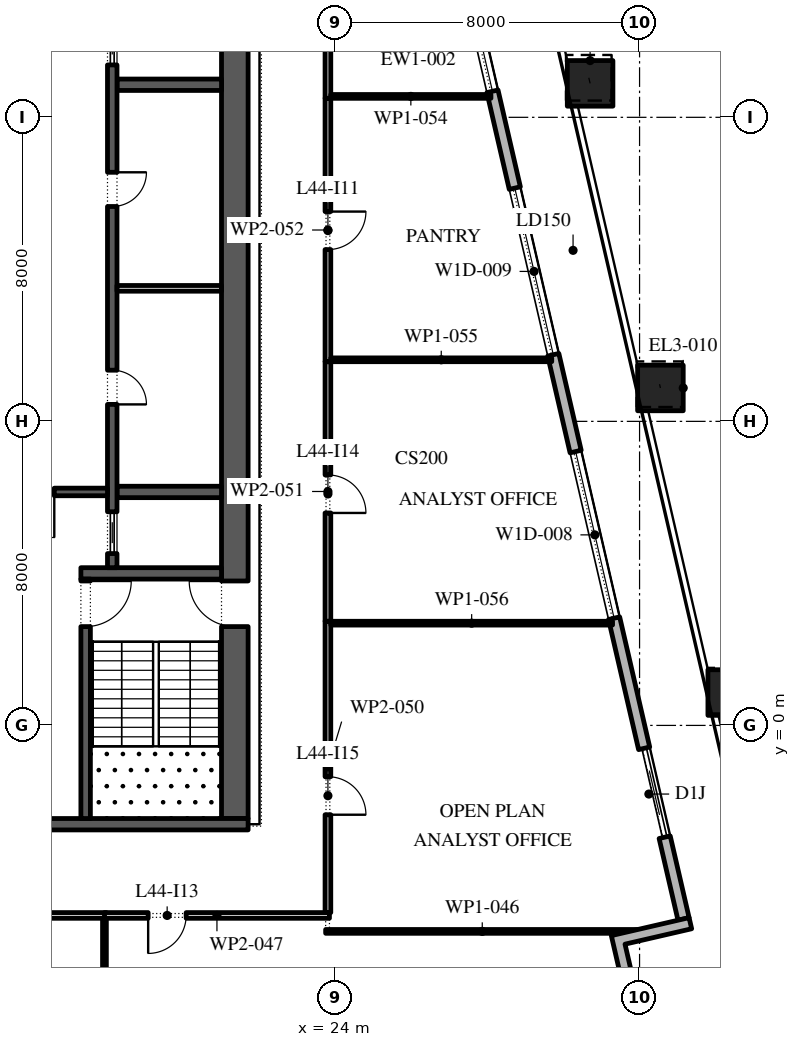
"""IFC4 building model, lengths in metres.
Left out: names, types, materials, properties, quantities, classifications, styles, units other than length and angle.
Written with IfcOpenShell. Run it as: python <this file> out.ifc"""

import sys

from ifc_helpers import new_model, si_unit, direction, frame, frame_2d, origin, origin_2d, place, context, subcontext, project, spatial, polyline, rectangle, outline, extrude, element, fill, save


model = new_model("IFC4")
c1 = context("Model", 3, precision=1e-05, world=origin(), true_north=direction((0.0, 1.0)))
c2 = subcontext(c1, "Body", "Model", "MODEL_VIEW")
j1 = project(units=[si_unit("LENGTHUNIT", "METRE"), si_unit("PLANEANGLEUNIT", "RADIAN")], contexts=[c1])
p1 = place(None, origin())
s1 = spatial("IfcSite", under=j1, at=p1, CompositionType="ELEMENT")
p2 = place(p1, origin())
s2 = spatial("IfcBuilding", under=s1, at=p2, CompositionType="ELEMENT")
p3 = place(p2, frame((0.0, 0.0, 201.0)))
s3 = spatial("IfcBuildingStorey", under=s2, at=p3, CompositionType="ELEMENT", Elevation=201.0)
p4 = place(p3, frame((34.399, 0.865, 0.0), z_axis=(-0.00267375834, 0.011741286623, 0.999927493974), x_axis=(-0.975037935076, -0.222038341651, 0.0)))
e1 = element("IfcColumn", 1, at=p4, inside=s3, PredefinedType="COLUMN", context=c2, shape_type="SweptSolid", body=[
    extrude(rectangle(XDim=1.2, YDim=1.2, at=origin_2d()), origin(), (0.0, 0.0, 1.0), 4.2),
])
p5 = place(p3, frame((32.549, 8.879, 0.0), z_axis=(-0.005404472139, 0.023419379268, 0.999711120452), x_axis=(-0.974391195695, -0.224859506699, 0.0)))
e2 = element("IfcColumn", 2, at=p5, inside=s3, PredefinedType="COLUMN", context=c2, shape_type="SweptSolid", body=[
    extrude(rectangle(XDim=1.2, YDim=1.2, at=origin_2d()), origin(), (0.0, 0.0, 1.0), 4.201),
])
p6 = place(p3, frame((30.698, 16.893, 0.0), z_axis=(-0.008074763646, 0.035029370347, 0.999353661826), x_axis=(-0.974445638882, -0.224623455729, 0.0)))
e3 = element("IfcColumn", 3, at=p6, inside=s3, PredefinedType="COLUMN", context=c2, shape_type="SweptSolid", body=[
    extrude(rectangle(XDim=1.2, YDim=1.2, at=origin_2d()), origin(), (0.0, 0.0, 1.0), 4.203),
])
p7 = place(p3, frame((33.157, -5.092, 0.0), z_axis=(0.0, 0.0, 1.0), x_axis=(-0.224950279389, 0.974370243697, 0.0)))
e4 = element("IfcWall", 4, at=p7, inside=s3, PredefinedType="STANDARD", context=c2, shape_type="SweptSolid", body=[
    extrude(rectangle(XDim=49.5, YDim=0.3, at=frame_2d((24.75, 0.0))), origin(), (0.0, 0.0, 1.0), 4.0),
])
p8 = place(p7, frame((2.207, 0.0, 0.0)))
e5 = element("IfcOpeningElement", 5, at=p8, cuts=e4, PredefinedType="OPENING", context=c2, shape_type="SweptSolid", body=[
    extrude(rectangle(XDim=2.4, YDim=3.125, at=frame_2d((1.2, 1.562))), frame((0.0, 0.16, 0.0), z_axis=(0.0, -1.0, 0.0), x_axis=(1.0, 0.0, 0.0)), (0.0, 0.0, 1.0), 0.32),
])
p9 = place(p7, frame((8.121, 0.0, 0.45)))
e6 = element("IfcOpeningElement", 6, at=p9, cuts=e4, PredefinedType="OPENING", context=c2, shape_type="SweptSolid", body=[
    extrude(rectangle(XDim=4.5, YDim=2.875, at=frame_2d((2.25, 1.438))), frame((0.0, 0.16, 0.0), z_axis=(0.0, -1.0, 0.0), x_axis=(1.0, 0.0, 0.0)), (0.0, 0.0, 1.0), 0.32),
])
p10 = place(p7, frame((15.236, 0.0, 0.45)))
e7 = element("IfcOpeningElement", 7, at=p10, cuts=e4, PredefinedType="OPENING", context=c2, shape_type="SweptSolid", body=[
    extrude(rectangle(XDim=4.5, YDim=2.875, at=frame_2d((2.25, 1.438))), frame((0.0, 0.16, 0.0), z_axis=(0.0, -1.0, 0.0), x_axis=(1.0, 0.0, 0.0)), (0.0, 0.0, 1.0), 0.32),
])
p11 = place(p7, frame((22.35, 0.0, 0.45)))
e8 = element("IfcOpeningElement", 8, at=p11, cuts=e4, PredefinedType="OPENING", context=c2, shape_type="SweptSolid", body=[
    extrude(rectangle(XDim=4.5, YDim=3.0, at=frame_2d((2.25, 1.5))), frame((0.0, 0.16, 0.0), z_axis=(0.0, -1.0, 0.0), x_axis=(1.0, 0.0, 0.0)), (0.0, 0.0, 1.0), 0.32),
])
p12 = place(p7, frame((30.514, 0.0, 0.0)))
e9 = element("IfcOpeningElement", 9, at=p12, cuts=e4, PredefinedType="OPENING", context=c2, shape_type="SweptSolid", body=[
    extrude(rectangle(XDim=2.4, YDim=3.45, at=frame_2d((1.2, 1.725))), frame((0.0, 0.16, 0.0), z_axis=(0.0, -1.0, 0.0), x_axis=(1.0, 0.0, 0.0)), (0.0, 0.0, 1.0), 0.32),
])
p13 = place(p7, frame((36.579, 0.0, 0.45)))
e10 = element("IfcOpeningElement", 10, at=p13, cuts=e4, PredefinedType="OPENING", context=c2, shape_type="SweptSolid", body=[
    extrude(rectangle(XDim=4.5, YDim=3.05, at=frame_2d((2.25, 1.525))), frame((0.0, 0.16, 0.0), z_axis=(0.0, -1.0, 0.0), x_axis=(1.0, 0.0, 0.0)), (0.0, 0.0, 1.0), 0.32),
])
p14 = place(p7, frame((43.693, 0.0, 0.45)))
e11 = element("IfcOpeningElement", 11, at=p14, cuts=e4, PredefinedType="OPENING", context=c2, shape_type="SweptSolid", body=[
    extrude(rectangle(XDim=4.5, YDim=3.05, at=frame_2d((2.25, 1.525))), frame((0.0, 0.16, 0.0), z_axis=(0.0, -1.0, 0.0), x_axis=(1.0, 0.0, 0.0)), (0.0, 0.0, 1.0), 0.32),
])
p15 = place(p3, origin())
e12 = element("IfcWall", 12, at=p15, inside=s3, PredefinedType="STANDARD", context=c2, shape_type="SweptSolid", body=[
    extrude(outline(polyline([(31.662, -7.285), (31.257, -5.531), (33.303, -5.058), (33.371, -5.351), (31.617, -5.756), (32.022, -7.51), (30.268, -7.914), (30.605, -9.376), (30.313, -9.443), (29.908, -7.69), (31.662, -7.285)])), origin(), (0.0, 0.0, 1.0), 4.0),
])
p16 = place(p3, frame((21.35, -2.45, 0.0), z_axis=(0.0, 0.0, 1.0), x_axis=(0.0, 1.0, 0.0)))
e13 = element("IfcWall", 13, at=p16, inside=s3, PredefinedType="SHEAR", context=c2, shape_type="SweptSolid", body=[
    extrude(rectangle(XDim=27.9, YDim=0.7, at=frame_2d((13.95, 0.0))), origin(), (0.0, 0.0, 1.0), 4.0),
])
p17 = place(p16, frame((5.05, 0.0, 0.0)))
e14 = element("IfcOpeningElement", 14, at=p17, cuts=e13, PredefinedType="OPENING", context=c2, shape_type="SweptSolid", body=[
    extrude(rectangle(XDim=1.2, YDim=2.1, at=frame_2d((0.6, 1.05))), frame((0.0, 0.36, 0.0), z_axis=(0.0, -1.0, 0.0), x_axis=(1.0, 0.0, 0.0)), (0.0, 0.0, 1.0), 0.72),
])
p18 = place(p16, frame((21.65, 0.0, 0.0)))
e15 = element("IfcOpeningElement", 15, at=p18, cuts=e13, PredefinedType="OPENING", context=c2, shape_type="SweptSolid", body=[
    extrude(rectangle(XDim=1.2, YDim=2.1, at=frame_2d((0.6, 1.05))), frame((0.0, 0.36, 0.0), z_axis=(0.0, -1.0, 0.0), x_axis=(1.0, 0.0, 0.0)), (0.0, 0.0, 1.0), 0.72),
])
p19 = place(p3, frame((10.3, -2.6, 0.0), z_axis=(0.0, 0.0, 1.0), x_axis=(1.0, 0.0, 0.0)))
e16 = element("IfcWall", 16, at=p19, inside=s3, PredefinedType="SHEAR", context=c2, shape_type="SweptSolid", body=[
    extrude(rectangle(XDim=11.4, YDim=0.3, at=frame_2d((5.7, 0.0))), origin(), (0.0, 0.0, 1.0), 4.0),
])
p20 = place(p3, frame((17.3, 4.0, 0.0), z_axis=(0.0, 0.0, 1.0), x_axis=(1.0, 0.0, 0.0)))
e17 = element("IfcWall", 17, at=p20, inside=s3, PredefinedType="SHEAR", context=c2, shape_type="SweptSolid", body=[
    extrude(rectangle(XDim=3.7, YDim=0.3, at=frame_2d((1.85, 0.0))), origin(), (0.0, 0.0, 1.0), 4.0),
])
p21 = place(p3, frame((17.425, -2.45, 0.0), z_axis=(0.0, 0.0, 1.0), x_axis=(0.0, 1.0, 0.0)))
e18 = element("IfcWall", 18, at=p21, inside=s3, PredefinedType="SHEAR", context=c2, shape_type="SweptSolid", body=[
    extrude(rectangle(XDim=6.3, YDim=0.25, at=frame_2d((3.15, 0.0))), origin(), (0.0, 0.0, 1.0), 4.0),
])
p22 = place(p21, frame((5.05, 0.0, 0.0)))
e19 = element("IfcOpeningElement", 19, at=p22, cuts=e18, PredefinedType="OPENING", context=c2, shape_type="SweptSolid", body=[
    extrude(rectangle(XDim=1.2, YDim=2.1, at=frame_2d((0.6, 1.05))), frame((0.0, 0.135, 0.0), z_axis=(0.0, -1.0, 0.0), x_axis=(1.0, 0.0, 0.0)), (0.0, 0.0, 1.0), 0.27),
])
for number, where, z_axis, x_axis in (
    (20, (18.25, 6.143, 0.0), (0.0, 0.0, 1.0), (1.0, 0.0, 0.0)),
    (21, (18.25, 16.857, 0.0), (0.0, 0.0, 1.0), (1.0, 0.0, 0.0)),
):
    element("IfcWall", number, at=place(p3, frame(where, z_axis=z_axis, x_axis=x_axis)), inside=s3, PredefinedType="SHEAR", context=c2, shape_type="SweptSolid", body=[
        extrude(rectangle(XDim=2.75, YDim=0.3, at=frame_2d((1.375, 0.0))), origin(), (0.0, 0.0, 1.0), 4.0),
    ])
p23 = place(p3, frame((18.125, 4.15, 0.0), z_axis=(0.0, 0.0, 1.0), x_axis=(0.0, 1.0, 0.0)))
e22 = element("IfcWall", 22, at=p23, inside=s3, PredefinedType="SHEAR", context=c2, shape_type="SweptSolid", body=[
    extrude(rectangle(XDim=14.7, YDim=0.25, at=frame_2d((7.35, 0.0))), origin(), (0.0, 0.0, 1.0), 4.0),
])
p24 = place(p23, frame((4.296, 0.0, 0.0)))
e23 = element("IfcOpeningElement", 23, at=p24, cuts=e22, PredefinedType="OPENING", context=c2, shape_type="SweptSolid", body=[
    extrude(rectangle(XDim=0.9, YDim=2.1, at=frame_2d((0.45, 1.05))), frame((0.0, 0.135, 0.0), z_axis=(0.0, -1.0, 0.0), x_axis=(1.0, 0.0, 0.0)), (0.0, 0.0, 1.0), 0.27),
])
p25 = place(p23, frame((9.504, 0.0, 0.0)))
e24 = element("IfcOpeningElement", 24, at=p25, cuts=e22, PredefinedType="OPENING", context=c2, shape_type="SweptSolid", body=[
    extrude(rectangle(XDim=0.9, YDim=2.1, at=frame_2d((0.45, 1.05))), frame((0.0, 0.135, 0.0), z_axis=(0.0, -1.0, 0.0), x_axis=(1.0, 0.0, 0.0)), (0.0, 0.0, 1.0), 0.27),
])
p26 = place(p23, frame((0.371, 0.0, 0.0)))
e25 = element("IfcOpeningElement", 25, at=p26, cuts=e22, PredefinedType="OPENING", context=c2, shape_type="SweptSolid", body=[
    extrude(rectangle(XDim=1.1, YDim=2.1, at=frame_2d((0.55, 1.05))), frame((0.0, 0.135, 0.0), z_axis=(0.0, -1.0, 0.0), x_axis=(1.0, 0.0, 0.0)), (0.0, 0.0, 1.0), 0.27),
])
p27 = place(p23, frame((13.229, 0.0, 0.0)))
e26 = element("IfcOpeningElement", 26, at=p27, cuts=e22, PredefinedType="OPENING", context=c2, shape_type="SweptSolid", body=[
    extrude(rectangle(XDim=1.1, YDim=2.1, at=frame_2d((0.55, 1.05))), frame((0.0, 0.135, 0.0), z_axis=(0.0, -1.0, 0.0), x_axis=(1.0, 0.0, 0.0)), (0.0, 0.0, 1.0), 0.27),
])
p28 = place(p3, frame((18.25, 11.5, 0.0), z_axis=(0.0, 0.0, 1.0), x_axis=(1.0, 0.0, 0.0)))
e27 = element("IfcWall", 27, at=p28, inside=s3, PredefinedType="PARTITIONING", context=c2, shape_type="SweptSolid", body=[
    extrude(rectangle(XDim=2.75, YDim=0.15, at=frame_2d((1.375, 0.0))), origin(), (0.0, 0.0, 1.0), 4.0),
])
p29 = place(p3, frame((14.0, 6.143, 0.0), z_axis=(0.0, 0.0, 1.0), x_axis=(1.0, 0.0, 0.0)))
e28 = element("IfcWall", 28, at=p29, inside=s3, PredefinedType="SHEAR", context=c2, shape_type="SweptSolid", body=[
    extrude(rectangle(XDim=4.0, YDim=0.2, at=frame_2d((2.0, 0.0))), origin(), (0.0, 0.0, 1.0), 4.0),
])
p30 = place(p29, frame((1.4, 0.0, 0.0)))
e29 = element("IfcOpeningElement", 29, at=p30, cuts=e28, PredefinedType="OPENING", context=c2, shape_type="SweptSolid", body=[
    extrude(rectangle(XDim=1.2, YDim=2.1, at=frame_2d((0.6, 1.05))), frame((0.0, 0.11, 0.0), z_axis=(0.0, -1.0, 0.0), x_axis=(1.0, 0.0, 0.0)), (0.0, 0.0, 1.0), 0.22),
])
p31 = place(p3, frame((17.97, -5.0, 0.0), z_axis=(0.0, 0.0, 1.0), x_axis=(-1.0, 0.0, 0.0)))
e30 = element("IfcWall", 30, at=p31, inside=s3, PredefinedType="PARTITIONING", context=c2, shape_type="SweptSolid", body=[
    extrude(rectangle(XDim=7.97, YDim=0.15, at=frame_2d((3.985, 0.0))), origin(), (0.0, 0.0, 1.0), 4.0),
])
p32 = place(p3, frame((17.92, -5.075, 0.0), z_axis=(0.0, 0.0, 1.0), x_axis=(0.0, -1.0, 0.0)))
e31 = element("IfcWall", 31, at=p32, inside=s3, PredefinedType="PARTITIONING", context=c2, shape_type="SweptSolid", body=[
    extrude(rectangle(XDim=7.312, YDim=0.1, at=frame_2d((3.656, 0.0))), origin(), (0.0, 0.0, 1.0), 4.0),
])
p33 = place(p3, frame((23.74, -5.42, 0.0), z_axis=(0.0, 0.0, 1.0), x_axis=(1.0, 0.0, 0.0)))
e32 = element("IfcWall", 32, at=p33, inside=s3, PredefinedType="PARTITIONING", context=c2, shape_type="SweptSolid", body=[
    extrude(rectangle(XDim=8.242, YDim=0.1, at=frame_2d((4.121, 0.0))), origin(), (0.0, 0.0, 1.0), 4.0),
])
p34 = place(p3, frame((23.84, -5.0, 0.0), z_axis=(0.0, 0.0, 1.0), x_axis=(-1.0, 0.0, 0.0)))
e33 = element("IfcWall", 33, at=p34, inside=s3, PredefinedType="PARTITIONING", context=c2, shape_type="SweptSolid", body=[
    extrude(rectangle(XDim=5.92, YDim=0.15, at=frame_2d((2.96, 0.0))), origin(), (0.0, 0.0, 1.0), 4.0),
])
p35 = place(p34, frame((3.77, 0.0, 0.0)))
e34 = element("IfcOpeningElement", 34, at=p35, cuts=e33, PredefinedType="OPENING", context=c2, shape_type="SweptSolid", body=[
    extrude(rectangle(XDim=1.0, YDim=2.1, at=frame_2d((0.5, 1.05))), frame((0.0, 0.085, 0.0), z_axis=(0.0, -1.0, 0.0), x_axis=(1.0, 0.0, 0.0)), (0.0, 0.0, 1.0), 0.17),
])
p36 = place(p3, frame((23.8, 2.74, 0.0), z_axis=(0.0, 0.0, 1.0), x_axis=(0.0, -1.0, 0.0)))
e35 = element("IfcWall", 35, at=p36, inside=s3, PredefinedType="PARTITIONING", context=c2, shape_type="SweptSolid", body=[
    extrude(rectangle(XDim=7.665, YDim=0.15, at=frame_2d((3.833, 0.0))), origin(), (0.0, 0.0, 1.0), 4.0),
])
p37 = place(p36, frame((4.09, 0.0, 0.0)))
e36 = element("IfcOpeningElement", 36, at=p37, cuts=e35, PredefinedType="OPENING", context=c2, shape_type="SweptSolid", body=[
    extrude(rectangle(XDim=1.0, YDim=2.1, at=frame_2d((0.5, 1.05))), frame((0.0, 0.085, 0.0), z_axis=(0.0, -1.0, 0.0), x_axis=(1.0, 0.0, 0.0)), (0.0, 0.0, 1.0), 0.17),
])
p38 = place(p3, frame((23.8, 9.57, 0.0), z_axis=(0.0, 0.0, 1.0), x_axis=(0.0, -1.0, 0.0)))
e37 = element("IfcWall", 37, at=p38, inside=s3, PredefinedType="PARTITIONING", context=c2, shape_type="SweptSolid", body=[
    extrude(rectangle(XDim=6.83, YDim=0.15, at=frame_2d((3.415, 0.0))), origin(), (0.0, 0.0, 1.0), 4.0),
])
p39 = place(p38, frame((2.98, 0.0, 0.0)))
e38 = element("IfcOpeningElement", 38, at=p39, cuts=e37, PredefinedType="OPENING", context=c2, shape_type="SweptSolid", body=[
    extrude(rectangle(XDim=1.0, YDim=2.1, at=frame_2d((0.5, 1.05))), frame((0.0, 0.085, 0.0), z_axis=(0.0, -1.0, 0.0), x_axis=(1.0, 0.0, 0.0)), (0.0, 0.0, 1.0), 0.17),
])
p40 = place(p3, frame((23.8, 16.5, 0.0), z_axis=(0.0, 0.0, 1.0), x_axis=(0.0, -1.0, 0.0)))
e39 = element("IfcWall", 39, at=p40, inside=s3, PredefinedType="PARTITIONING", context=c2, shape_type="SweptSolid", body=[
    extrude(rectangle(XDim=6.93, YDim=0.15, at=frame_2d((3.465, 0.0))), origin(), (0.0, 0.0, 1.0), 4.0),
])
p41 = place(p40, frame((2.98, 0.0, 0.0)))
e40 = element("IfcOpeningElement", 40, at=p41, cuts=e39, PredefinedType="OPENING", context=c2, shape_type="SweptSolid", body=[
    extrude(rectangle(XDim=1.0, YDim=2.1, at=frame_2d((0.5, 1.05))), frame((0.0, 0.085, 0.0), z_axis=(0.0, -1.0, 0.0), x_axis=(1.0, 0.0, 0.0)), (0.0, 0.0, 1.0), 0.17),
])
p42 = place(p3, frame((23.8, 27.2, 0.0), z_axis=(0.0, 0.0, 1.0), x_axis=(0.0, -1.0, 0.0)))
e41 = element("IfcWall", 41, at=p42, inside=s3, PredefinedType="PARTITIONING", context=c2, shape_type="SweptSolid", body=[
    extrude(rectangle(XDim=10.7, YDim=0.15, at=frame_2d((5.35, 0.0))), origin(), (0.0, 0.0, 1.0), 4.0),
])
p43 = place(p42, frame((6.0, 0.0, 0.0)))
e42 = element("IfcOpeningElement", 42, at=p43, cuts=e41, PredefinedType="OPENING", context=c2, shape_type="SweptSolid", body=[
    extrude(rectangle(XDim=1.0, YDim=2.1, at=frame_2d((0.5, 1.05))), frame((0.0, 0.085, 0.0), z_axis=(0.0, -1.0, 0.0), x_axis=(1.0, 0.0, 0.0)), (0.0, 0.0, 1.0), 0.17),
])
p44 = place(p3, frame((28.089, 16.55, 0.0), z_axis=(0.0, 0.0, 1.0), x_axis=(-1.0, 0.0, 0.0)))
e43 = element("IfcWall", 43, at=p44, inside=s3, PredefinedType="PARTITIONING", context=c2, shape_type="SweptSolid", body=[
    extrude(rectangle(XDim=4.214, YDim=0.1, at=frame_2d((2.107, 0.0))), origin(), (0.0, 0.0, 1.0), 4.0),
])
p45 = place(p3, frame((29.689, 9.62, 0.0), z_axis=(0.0, 0.0, 1.0), x_axis=(-1.0, 0.0, 0.0)))
e44 = element("IfcWall", 44, at=p45, inside=s3, PredefinedType="PARTITIONING", context=c2, shape_type="SweptSolid", body=[
    extrude(rectangle(XDim=5.814, YDim=0.1, at=frame_2d((2.907, 0.0))), origin(), (0.0, 0.0, 1.0), 4.0),
])
p46 = place(p3, frame((31.289, 2.69, 0.0), z_axis=(0.0, 0.0, 1.0), x_axis=(-1.0, 0.0, 0.0)))
e45 = element("IfcWall", 45, at=p46, inside=s3, PredefinedType="PARTITIONING", context=c2, shape_type="SweptSolid", body=[
    extrude(rectangle(XDim=7.414, YDim=0.1, at=frame_2d((3.707, 0.0))), origin(), (0.0, 0.0, 1.0), 4.0),
])
p47 = place(p8, origin())
e46 = element("IfcDoor", 46, at=p47, inside=s3, OperationType="DOUBLE_DOOR_SLIDING", PredefinedType="DOOR", context=c2, shape_type="SweptSolid", body=[
    extrude(rectangle(XDim=2.4, YDim=3.125, at=frame_2d((1.2, 1.562))), frame((0.0, 0.025, 0.0), z_axis=(0.0, -1.0, 0.0), x_axis=(1.0, 0.0, 0.0)), (0.0, 0.0, 1.0), 0.05),
])
fill(e5, e46)
p48 = place(p9, origin())
e47 = element("IfcWindow", 47, at=p48, inside=s3, PartitioningType="DOUBLE_PANEL_VERTICAL", PredefinedType="WINDOW", context=c2, shape_type="SweptSolid", body=[
    extrude(rectangle(XDim=4.5, YDim=2.875, at=frame_2d((2.25, 1.438))), frame((0.0, 0.03, 0.0), z_axis=(0.0, -1.0, 0.0), x_axis=(1.0, 0.0, 0.0)), (0.0, 0.0, 1.0), 0.06),
])
fill(e6, e47)
p49 = place(p10, origin())
e48 = element("IfcWindow", 48, at=p49, inside=s3, PartitioningType="DOUBLE_PANEL_VERTICAL", PredefinedType="WINDOW", context=c2, shape_type="SweptSolid", body=[
    extrude(rectangle(XDim=4.5, YDim=2.875, at=frame_2d((2.25, 1.438))), frame((0.0, 0.03, 0.0), z_axis=(0.0, -1.0, 0.0), x_axis=(1.0, 0.0, 0.0)), (0.0, 0.0, 1.0), 0.06),
])
fill(e7, e48)
p50 = place(p11, origin())
e49 = element("IfcWindow", 49, at=p50, inside=s3, PartitioningType="DOUBLE_PANEL_VERTICAL", PredefinedType="WINDOW", context=c2, shape_type="SweptSolid", body=[
    extrude(rectangle(XDim=4.5, YDim=3.0, at=frame_2d((2.25, 1.5))), frame((0.0, 0.03, 0.0), z_axis=(0.0, -1.0, 0.0), x_axis=(1.0, 0.0, 0.0)), (0.0, 0.0, 1.0), 0.06),
])
fill(e8, e49)
p51 = place(p24, frame((0.9, -0.2, 0.0), z_axis=(0.0, 0.0, 1.0), x_axis=(-1.0, 0.0, 0.0)))
e50 = element("IfcDoor", 50, at=p51, inside=s3, OperationType="SINGLE_SWING_LEFT", PredefinedType="DOOR", context=c2, shape_type="SweptSolid", body=[
    extrude(rectangle(XDim=0.9, YDim=2.1, at=frame_2d((0.45, 1.05))), frame((0.0, -0.075, 0.0), z_axis=(0.0, -1.0, 0.0), x_axis=(1.0, 0.0, 0.0)), (0.0, 0.0, 1.0), 0.05),
])
fill(e23, e50)
p52 = place(p25, frame((0.9, -0.2, 0.0), z_axis=(0.0, 0.0, 1.0), x_axis=(-1.0, 0.0, 0.0)))
e51 = element("IfcDoor", 51, at=p52, inside=s3, OperationType="SINGLE_SWING_RIGHT", PredefinedType="DOOR", context=c2, shape_type="SweptSolid", body=[
    extrude(rectangle(XDim=0.9, YDim=2.1, at=frame_2d((0.45, 1.05))), frame((0.0, -0.075, 0.0), z_axis=(0.0, -1.0, 0.0), x_axis=(1.0, 0.0, 0.0)), (0.0, 0.0, 1.0), 0.05),
])
fill(e24, e51)
p53 = place(p26, origin())
e52 = element("IfcDoor", 52, at=p53, inside=s3, OperationType="SLIDING_TO_LEFT", PredefinedType="DOOR", context=c2, shape_type="SweptSolid", body=[
    extrude(rectangle(XDim=1.1, YDim=2.1, at=frame_2d((0.55, 1.05))), frame((0.0, 0.025, 0.0), z_axis=(0.0, -1.0, 0.0), x_axis=(1.0, 0.0, 0.0)), (0.0, 0.0, 1.0), 0.05),
])
fill(e25, e52)
p54 = place(p27, origin())
e53 = element("IfcDoor", 53, at=p54, inside=s3, OperationType="SLIDING_TO_LEFT", PredefinedType="DOOR", context=c2, shape_type="SweptSolid", body=[
    extrude(rectangle(XDim=1.1, YDim=2.1, at=frame_2d((0.55, 1.05))), frame((0.0, 0.025, 0.0), z_axis=(0.0, -1.0, 0.0), x_axis=(1.0, 0.0, 0.0)), (0.0, 0.0, 1.0), 0.05),
])
fill(e26, e53)
p55 = place(p30, frame((1.2, 0.0, 0.0), z_axis=(0.0, 0.0, 1.0), x_axis=(-1.0, 0.0, 0.0)))
e54 = element("IfcDoor", 54, at=p55, inside=s3, OperationType="SINGLE_SWING_RIGHT", PredefinedType="DOOR", context=c2, shape_type="SweptSolid", body=[
    extrude(rectangle(XDim=1.2, YDim=2.1, at=frame_2d((0.6, 1.05))), frame((0.0, 0.025, 0.0), z_axis=(0.0, -1.0, 0.0), x_axis=(1.0, 0.0, 0.0)), (0.0, 0.0, 1.0), 0.05),
])
fill(e29, e54)
p56 = place(p22, frame((1.2, 0.0, 0.0), z_axis=(0.0, 0.0, 1.0), x_axis=(-1.0, 0.0, 0.0)))
e55 = element("IfcDoor", 55, at=p56, inside=s3, OperationType="SINGLE_SWING_RIGHT", PredefinedType="DOOR", context=c2, shape_type="SweptSolid", body=[
    extrude(rectangle(XDim=1.2, YDim=2.1, at=frame_2d((0.6, 1.05))), frame((0.0, 0.025, 0.0), z_axis=(0.0, -1.0, 0.0), x_axis=(1.0, 0.0, 0.0)), (0.0, 0.0, 1.0), 0.05),
])
fill(e19, e55)
p57 = place(p17, origin())
e56 = element("IfcDoor", 56, at=p57, inside=s3, OperationType="SINGLE_SWING_LEFT", PredefinedType="DOOR", context=c2, shape_type="SweptSolid", body=[
    extrude(rectangle(XDim=1.2, YDim=2.1, at=frame_2d((0.6, 1.05))), frame((0.0, 0.025, 0.0), z_axis=(0.0, -1.0, 0.0), x_axis=(1.0, 0.0, 0.0)), (0.0, 0.0, 1.0), 0.05),
])
fill(e14, e56)
p58 = place(p41, origin())
e57 = element("IfcDoor", 57, at=p58, inside=s3, OperationType="SINGLE_SWING_RIGHT", PredefinedType="DOOR", context=c2, shape_type="SweptSolid", body=[
    extrude(rectangle(XDim=1.0, YDim=2.1, at=frame_2d((0.5, 1.05))), frame((0.0, 0.025, 0.0), z_axis=(0.0, -1.0, 0.0), x_axis=(1.0, 0.0, 0.0)), (0.0, 0.0, 1.0), 0.05),
])
fill(e40, e57)
p59 = place(p35, origin())
e58 = element("IfcDoor", 58, at=p59, inside=s3, OperationType="SINGLE_SWING_LEFT", PredefinedType="DOOR", context=c2, shape_type="SweptSolid", body=[
    extrude(rectangle(XDim=1.0, YDim=2.1, at=frame_2d((0.5, 1.05))), frame((0.0, 0.025, 0.0), z_axis=(0.0, -1.0, 0.0), x_axis=(1.0, 0.0, 0.0)), (0.0, 0.0, 1.0), 0.05),
])
fill(e34, e58)
p60 = place(p39, origin())
e59 = element("IfcDoor", 59, at=p60, inside=s3, OperationType="SINGLE_SWING_LEFT", PredefinedType="DOOR", context=c2, shape_type="SweptSolid", body=[
    extrude(rectangle(XDim=1.0, YDim=2.1, at=frame_2d((0.5, 1.05))), frame((0.0, 0.025, 0.0), z_axis=(0.0, -1.0, 0.0), x_axis=(1.0, 0.0, 0.0)), (0.0, 0.0, 1.0), 0.05),
])
fill(e38, e59)
p61 = place(p37, origin())
e60 = element("IfcDoor", 60, at=p61, inside=s3, OperationType="SINGLE_SWING_LEFT", PredefinedType="DOOR", context=c2, shape_type="SweptSolid", body=[
    extrude(rectangle(XDim=1.0, YDim=2.1, at=frame_2d((0.5, 1.05))), frame((0.0, 0.025, 0.0), z_axis=(0.0, -1.0, 0.0), x_axis=(1.0, 0.0, 0.0)), (0.0, 0.0, 1.0), 0.05),
])
fill(e36, e60)
save(model, sys.argv[1])
